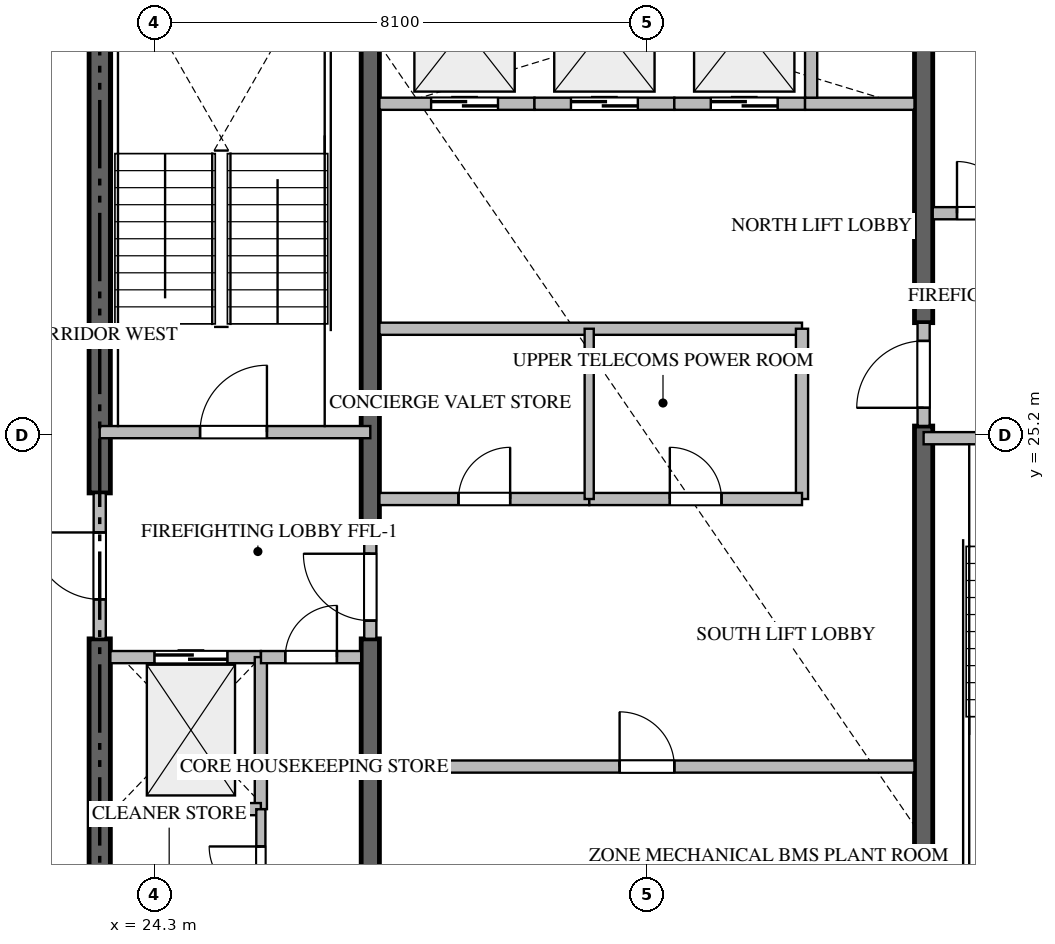
"""IFC4 building model, lengths in metres.
Left out: names, types, materials, properties, quantities, classifications, styles, units other than length and angle.
Written with IfcOpenShell. Run it as: python <this file> out.ifc"""

import sys

from ifc_helpers import new_model, si_unit, direction, frame, frame_2d, origin, place, context, subcontext, project, spatial, rectangle, extrude, source, transform, mapped, element, fill, save


model = new_model("IFC4")
c1 = context("Model", 3, precision=1e-05, world=origin(), true_north=direction((0.0, 1.0)))
c2 = subcontext(c1, "Body", "Model", "MODEL_VIEW")
j1 = project(units=[si_unit("LENGTHUNIT", "METRE"), si_unit("PLANEANGLEUNIT", "RADIAN")], contexts=[c1])
p1 = place(None, origin())
s1 = spatial("IfcSite", under=j1, at=p1, CompositionType="ELEMENT")
p2 = place(p1, origin())
s2 = spatial("IfcBuilding", under=s1, at=p2, CompositionType="ELEMENT")
p3 = place(p2, frame((0.0, 0.0, 305.6)))
s3 = spatial("IfcBuildingStorey", under=s2, at=p3, CompositionType="ELEMENT", Elevation=305.6)
p4 = place(p3, frame((23.4, 16.975, -0.26), z_axis=(0.0, 0.0, 1.0), x_axis=(0.0, 1.0, 0.0)))
e1 = element("IfcWall", 1, at=p4, inside=s3, PredefinedType="SHEAR", context=c2, shape_type="SweptSolid", body=[
    extrude(rectangle(XDim=4.875, YDim=0.35, at=frame_2d((2.438, 0.0))), origin(), (0.0, 0.0, 1.0), 4.048),
])
p5 = place(p3, frame((23.4, 24.25, -0.26), z_axis=(0.0, 0.0, 1.0), x_axis=(0.0, 1.0, 0.0)))
e2 = element("IfcWall", 2, at=p5, inside=s3, PredefinedType="SHEAR", context=c2, shape_type="SweptSolid", body=[
    extrude(rectangle(XDim=9.175, YDim=0.35, at=frame_2d((4.587, 0.0))), origin(), (0.0, 0.0, 1.0), 4.048),
])
p6 = place(p3, frame((27.85, 16.975, -0.26), z_axis=(0.0, 0.0, 1.0), x_axis=(0.0, 1.0, 0.0)))
e3 = element("IfcWall", 3, at=p6, inside=s3, PredefinedType="SHEAR", context=c2, shape_type="SweptSolid", body=[
    extrude(rectangle(XDim=4.875, YDim=0.3, at=frame_2d((2.438, 0.0))), origin(), (0.0, 0.0, 1.0), 4.048),
])
p7 = place(p3, frame((27.85, 23.55, -0.26), z_axis=(0.0, 0.0, 1.0), x_axis=(0.0, 1.0, 0.0)))
e4 = element("IfcWall", 4, at=p7, inside=s3, PredefinedType="SHEAR", context=c2, shape_type="SweptSolid", body=[
    extrude(rectangle(XDim=9.875, YDim=0.3, at=frame_2d((4.938, 0.0))), origin(), (0.0, 0.0, 1.0), 4.048),
])
p8 = place(p3, frame((36.95, 16.975, -0.26), z_axis=(0.0, 0.0, 1.0), x_axis=(0.0, 1.0, 0.0)))
e5 = element("IfcWall", 5, at=p8, inside=s3, PredefinedType="SHEAR", context=c2, shape_type="SweptSolid", body=[
    extrude(rectangle(XDim=8.375, YDim=0.3, at=frame_2d((4.188, 0.0))), origin(), (0.0, 0.0, 1.0), 4.048),
])
p9 = place(p3, frame((36.95, 27.05, -0.26), z_axis=(0.0, 0.0, 1.0), x_axis=(0.0, 1.0, 0.0)))
e6 = element("IfcWall", 6, at=p9, inside=s3, PredefinedType="SHEAR", context=c2, shape_type="SweptSolid", body=[
    extrude(rectangle(XDim=6.375, YDim=0.3, at=frame_2d((3.188, 0.0))), origin(), (0.0, 0.0, 1.0), 4.048),
])
p10 = place(p3, frame((23.4, 25.25, 0.0), z_axis=(0.0, 0.0, 1.0), x_axis=(1.0, 0.0, 0.0)))
e7 = element("IfcWall", 7, at=p10, inside=s3, PredefinedType="STANDARD", context=c2, shape_type="SweptSolid", body=[
    extrude(rectangle(XDim=4.45, YDim=0.2, at=frame_2d((2.225, 0.0))), origin(), (0.0, 0.0, 1.0), 3.79),
])
p11 = place(p10, frame((1.65, 0.0, 0.0)))
e8 = element("IfcOpeningElement", 8, at=p11, cuts=e7, PredefinedType="OPENING", context=c2, shape_type="SweptSolid", body=[
    extrude(rectangle(XDim=1.1, YDim=2.15, at=frame_2d((0.55, 1.075))), frame((0.0, 0.11, 0.0), z_axis=(0.0, -1.0, 0.0), x_axis=(1.0, 0.0, 0.0)), (0.0, 0.0, 1.0), 0.22),
])
p12 = place(p3, frame((36.95, 25.15, 0.0), z_axis=(0.0, 0.0, 1.0), x_axis=(1.0, 0.0, 0.0)))
e9 = element("IfcWall", 9, at=p12, inside=s3, PredefinedType="STANDARD", context=c2, shape_type="SweptSolid", body=[
    extrude(rectangle(XDim=4.45, YDim=0.2, at=frame_2d((2.225, 0.0))), origin(), (0.0, 0.0, 1.0), 3.79),
])
p13 = place(p12, frame((1.65, 0.0, 0.0)))
e10 = element("IfcOpeningElement", 10, at=p13, cuts=e9, PredefinedType="OPENING", context=c2, shape_type="SweptSolid", body=[
    extrude(rectangle(XDim=1.1, YDim=2.15, at=frame_2d((0.55, 1.075))), frame((0.0, 0.11, 0.0), z_axis=(0.0, -1.0, 0.0), x_axis=(1.0, 0.0, 0.0)), (0.0, 0.0, 1.0), 0.22),
])
p14 = place(p3, frame((23.575, 21.55, 0.0), z_axis=(0.0, 0.0, 1.0), x_axis=(1.0, 0.0, 0.0)))
e11 = element("IfcWall", 11, at=p14, inside=s3, PredefinedType="STANDARD", context=c2, shape_type="SweptSolid", body=[
    extrude(rectangle(XDim=2.475, YDim=0.2, at=frame_2d((1.238, 0.0))), origin(), (0.0, 0.0, 1.0), 3.79),
])
p15 = place(p14, frame((0.725, 0.0, 0.0)))
e12 = element("IfcOpeningElement", 12, at=p15, cuts=e11, PredefinedType="OPENING", context=c2, shape_type="SweptSolid", body=[
    extrude(rectangle(XDim=1.2, YDim=2.2, at=frame_2d((0.6, 1.1))), frame((0.0, 0.11, 0.0), z_axis=(0.0, -1.0, 0.0), x_axis=(1.0, 0.0, 0.0)), (0.0, 0.0, 1.0), 0.22),
])
p16 = place(p3, frame((28.0, 30.65, 0.0), z_axis=(0.0, 0.0, 1.0), x_axis=(1.0, 0.0, 0.0)))
e13 = element("IfcWall", 13, at=p16, inside=s3, PredefinedType="STANDARD", context=c2, shape_type="SweptSolid", body=[
    extrude(rectangle(XDim=2.55, YDim=0.2, at=frame_2d((1.275, 0.0))), origin(), (0.0, 0.0, 1.0), 3.79),
])
p17 = place(p16, frame((0.85, 0.0, 0.0)))
e14 = element("IfcOpeningElement", 14, at=p17, cuts=e13, PredefinedType="OPENING", context=c2, shape_type="SweptSolid", body=[
    extrude(rectangle(XDim=1.1, YDim=2.2, at=frame_2d((0.55, 1.1))), frame((0.0, 0.11, 0.0), z_axis=(0.0, -1.0, 0.0), x_axis=(1.0, 0.0, 0.0)), (0.0, 0.0, 1.0), 0.22),
])
p18 = place(p3, frame((30.55, 30.65, 0.0), z_axis=(0.0, 0.0, 1.0), x_axis=(1.0, 0.0, 0.0)))
e15 = element("IfcWall", 15, at=p18, inside=s3, PredefinedType="STANDARD", context=c2, shape_type="SweptSolid", body=[
    extrude(rectangle(XDim=2.3, YDim=0.2, at=frame_2d((1.15, 0.0))), origin(), (0.0, 0.0, 1.0), 3.79),
])
p19 = place(p18, frame((0.6, 0.0, 0.0)))
e16 = element("IfcOpeningElement", 16, at=p19, cuts=e15, PredefinedType="OPENING", context=c2, shape_type="SweptSolid", body=[
    extrude(rectangle(XDim=1.1, YDim=2.2, at=frame_2d((0.55, 1.1))), frame((0.0, 0.11, 0.0), z_axis=(0.0, -1.0, 0.0), x_axis=(1.0, 0.0, 0.0)), (0.0, 0.0, 1.0), 0.22),
])
p20 = place(p3, frame((32.85, 30.65, 0.0), z_axis=(0.0, 0.0, 1.0), x_axis=(1.0, 0.0, 0.0)))
e17 = element("IfcWall", 17, at=p20, inside=s3, PredefinedType="STANDARD", context=c2, shape_type="SweptSolid", body=[
    extrude(rectangle(XDim=2.15, YDim=0.2, at=frame_2d((1.075, 0.0))), origin(), (0.0, 0.0, 1.0), 3.79),
])
p21 = place(p20, frame((0.6, 0.0, 0.0)))
e18 = element("IfcOpeningElement", 18, at=p21, cuts=e17, PredefinedType="OPENING", context=c2, shape_type="SweptSolid", body=[
    extrude(rectangle(XDim=1.1, YDim=2.2, at=frame_2d((0.55, 1.1))), frame((0.0, 0.11, 0.0), z_axis=(0.0, -1.0, 0.0), x_axis=(1.0, 0.0, 0.0)), (0.0, 0.0, 1.0), 0.22),
])
p22 = place(p3, frame((35.0, 30.65, 0.0), z_axis=(0.0, 0.0, 1.0), x_axis=(1.0, 0.0, 0.0)))
e19 = element("IfcWall", 19, at=p22, inside=s3, PredefinedType="STANDARD", context=c2, shape_type="SweptSolid", body=[
    extrude(rectangle(XDim=1.8, YDim=0.2, at=frame_2d((0.9, 0.0))), origin(), (0.0, 0.0, 1.0), 3.79),
])
p23 = place(p3, frame((35.1, 30.75, 0.0), z_axis=(0.0, 0.0, 1.0), x_axis=(0.0, 1.0, 0.0)))
e20 = element("IfcWall", 20, at=p23, inside=s3, PredefinedType="STANDARD", context=c2, shape_type="SweptSolid", body=[
    extrude(rectangle(XDim=2.675, YDim=0.2, at=frame_2d((1.337, 0.0))), origin(), (0.0, 0.0, 1.0), 3.79),
])
p24 = place(p3, frame((26.05, 19.05, 0.0), z_axis=(0.0, 0.0, 1.0), x_axis=(0.0, 1.0, 0.0)))
e21 = element("IfcWall", 21, at=p24, inside=s3, PredefinedType="STANDARD", context=c2, shape_type="SweptSolid", body=[
    extrude(rectangle(XDim=2.5, YDim=0.2, at=frame_2d((1.25, 0.0))), origin(), (0.0, 0.0, 1.0), 3.79),
])
p25 = place(p3, frame((23.575, 19.05, 0.0), z_axis=(0.0, 0.0, 1.0), x_axis=(1.0, 0.0, 0.0)))
e22 = element("IfcWall", 22, at=p25, inside=s3, PredefinedType="STANDARD", context=c2, shape_type="SweptSolid", body=[
    extrude(rectangle(XDim=2.475, YDim=0.2, at=frame_2d((1.238, 0.0))), origin(), (0.0, 0.0, 1.0), 3.79),
])
p26 = place(p3, frame((26.052, 21.55, 0.0), z_axis=(0.0, 0.0, 1.0), x_axis=(1.0, 0.0, 0.0)))
e23 = element("IfcWall", 23, at=p26, inside=s3, PredefinedType="STANDARD", context=c2, shape_type="SweptSolid", body=[
    extrude(rectangle(XDim=1.648, YDim=0.2, at=frame_2d((0.824, 0.0))), origin(), (0.0, 0.0, 1.0), 3.79),
])
p27 = place(p26, frame((0.399, 0.0, 0.0)))
e24 = element("IfcOpeningElement", 24, at=p27, cuts=e23, PredefinedType="OPENING", context=c2, shape_type="SweptSolid", body=[
    extrude(rectangle(XDim=0.85, YDim=2.1, at=frame_2d((0.425, 1.05))), frame((0.0, 0.11, 0.0), z_axis=(0.0, -1.0, 0.0), x_axis=(1.0, 0.0, 0.0)), (0.0, 0.0, 1.0), 0.22),
])
p28 = place(p3, frame((37.1, 28.85, 0.0), z_axis=(0.0, 0.0, 1.0), x_axis=(1.0, 0.0, 0.0)))
e25 = element("IfcWall", 25, at=p28, inside=s3, PredefinedType="STANDARD", context=c2, shape_type="SweptSolid", body=[
    extrude(rectangle(XDim=1.648, YDim=0.2, at=frame_2d((0.824, 0.0))), origin(), (0.0, 0.0, 1.0), 3.79),
])
p29 = place(p28, frame((0.399, 0.0, 0.0)))
e26 = element("IfcOpeningElement", 26, at=p29, cuts=e25, PredefinedType="OPENING", context=c2, shape_type="SweptSolid", body=[
    extrude(rectangle(XDim=0.85, YDim=2.1, at=frame_2d((0.425, 1.05))), frame((0.0, 0.11, 0.0), z_axis=(0.0, -1.0, 0.0), x_axis=(1.0, 0.0, 0.0)), (0.0, 0.0, 1.0), 0.22),
])
p30 = place(p3, frame((23.4, 21.852, 0.0), z_axis=(0.0, 0.0, 1.0), x_axis=(0.0, 1.0, 0.0)))
e27 = element("IfcWall", 27, at=p30, inside=s3, PredefinedType="STANDARD", context=c2, shape_type="SweptSolid", body=[
    extrude(rectangle(XDim=2.396, YDim=0.2, at=frame_2d((1.198, 0.0))), origin(), (0.0, 0.0, 1.0), 3.79),
])
p31 = place(p30, frame((0.648, 0.0, 0.0)))
e28 = element("IfcOpeningElement", 28, at=p31, cuts=e27, PredefinedType="OPENING", context=c2, shape_type="SweptSolid", body=[
    extrude(rectangle(XDim=1.1, YDim=2.15, at=frame_2d((0.55, 1.075))), frame((0.0, 0.11, 0.0), z_axis=(0.0, -1.0, 0.0), x_axis=(1.0, 0.0, 0.0)), (0.0, 0.0, 1.0), 0.22),
])
p32 = place(p3, frame((27.85, 21.852, 0.0), z_axis=(0.0, 0.0, 1.0), x_axis=(0.0, 1.0, 0.0)))
e29 = element("IfcWall", 29, at=p32, inside=s3, PredefinedType="STANDARD", context=c2, shape_type="SweptSolid", body=[
    extrude(rectangle(XDim=1.696, YDim=0.2, at=frame_2d((0.848, 0.0))), origin(), (0.0, 0.0, 1.0), 3.79),
])
p33 = place(p32, frame((0.298, 0.0, 0.0)))
e30 = element("IfcOpeningElement", 30, at=p33, cuts=e29, PredefinedType="OPENING", context=c2, shape_type="SweptSolid", body=[
    extrude(rectangle(XDim=1.1, YDim=2.15, at=frame_2d((0.55, 1.075))), frame((0.0, 0.11, 0.0), z_axis=(0.0, -1.0, 0.0), x_axis=(1.0, 0.0, 0.0)), (0.0, 0.0, 1.0), 0.22),
])
p34 = place(p3, frame((36.95, 25.352, 0.0), z_axis=(0.0, 0.0, 1.0), x_axis=(0.0, 1.0, 0.0)))
e31 = element("IfcWall", 31, at=p34, inside=s3, PredefinedType="STANDARD", context=c2, shape_type="SweptSolid", body=[
    extrude(rectangle(XDim=1.696, YDim=0.2, at=frame_2d((0.848, 0.0))), origin(), (0.0, 0.0, 1.0), 3.79),
])
p35 = place(p34, frame((0.298, 0.0, 0.0)))
e32 = element("IfcOpeningElement", 32, at=p35, cuts=e31, PredefinedType="OPENING", context=c2, shape_type="SweptSolid", body=[
    extrude(rectangle(XDim=1.1, YDim=2.15, at=frame_2d((0.55, 1.075))), frame((0.0, 0.11, 0.0), z_axis=(0.0, -1.0, 0.0), x_axis=(1.0, 0.0, 0.0)), (0.0, 0.0, 1.0), 0.22),
])
p36 = place(p3, frame((26.05, 16.975, 0.0), z_axis=(0.0, 0.0, 1.0), x_axis=(0.0, 1.0, 0.0)))
e33 = element("IfcWall", 33, at=p36, inside=s3, PredefinedType="PARTITIONING", context=c2, shape_type="SweptSolid", body=[
    extrude(rectangle(XDim=2.073, YDim=0.15, at=frame_2d((1.037, 0.0))), origin(), (0.0, 0.0, 1.0), 3.79),
])
p37 = place(p36, frame((0.611, 0.0, 0.0)))
e34 = element("IfcOpeningElement", 34, at=p37, cuts=e33, PredefinedType="OPENING", context=c2, shape_type="SweptSolid", body=[
    extrude(rectangle(XDim=0.85, YDim=2.1, at=frame_2d((0.425, 1.05))), frame((0.0, 0.085, 0.0), z_axis=(0.0, -1.0, 0.0), x_axis=(1.0, 0.0, 0.0)), (0.0, 0.0, 1.0), 0.17),
])
p38 = place(p3, frame((28.0, 19.75, 0.0), z_axis=(0.0, 0.0, 1.0), x_axis=(1.0, 0.0, 0.0)))
e35 = element("IfcWall", 35, at=p38, inside=s3, PredefinedType="STANDARD", context=c2, shape_type="SweptSolid", body=[
    extrude(rectangle(XDim=8.8, YDim=0.2, at=frame_2d((4.4, 0.0))), origin(), (0.0, 0.0, 1.0), 3.79),
])
p39 = place(p38, frame((3.95, 0.0, 0.0)))
e36 = element("IfcOpeningElement", 36, at=p39, cuts=e35, PredefinedType="OPENING", context=c2, shape_type="SweptSolid", body=[
    extrude(rectangle(XDim=0.9, YDim=2.1, at=frame_2d((0.45, 1.05))), frame((0.0, 0.11, 0.0), z_axis=(0.0, -1.0, 0.0), x_axis=(1.0, 0.0, 0.0)), (0.0, 0.0, 1.0), 0.22),
])
p40 = place(p3, frame((28.0, 26.95, 0.0), z_axis=(0.0, 0.0, 1.0), x_axis=(1.0, 0.0, 0.0)))
e37 = element("IfcWall", 37, at=p40, inside=s3, PredefinedType="STANDARD", context=c2, shape_type="SweptSolid", body=[
    extrude(rectangle(XDim=6.95, YDim=0.2, at=frame_2d((3.475, 0.0))), origin(), (0.0, 0.0, 1.0), 3.79),
])
p41 = place(p3, frame((34.95, 24.15, 0.0), z_axis=(0.0, 0.0, 1.0), x_axis=(0.0, 1.0, 0.0)))
e38 = element("IfcWall", 38, at=p41, inside=s3, PredefinedType="STANDARD", context=c2, shape_type="SweptSolid", body=[
    extrude(rectangle(XDim=2.8, YDim=0.2, at=frame_2d((1.4, 0.0))), origin(), (0.0, 0.0, 1.0), 3.79),
])
p42 = place(p3, frame((28.0, 24.15, 0.0), z_axis=(0.0, 0.0, 1.0), x_axis=(1.0, 0.0, 0.0)))
e39 = element("IfcWall", 39, at=p42, inside=s3, PredefinedType="STANDARD", context=c2, shape_type="SweptSolid", body=[
    extrude(rectangle(XDim=3.45, YDim=0.2, at=frame_2d((1.725, 0.0))), origin(), (0.0, 0.0, 1.0), 3.79),
])
p43 = place(p42, frame((1.3, 0.0, 0.0)))
e40 = element("IfcOpeningElement", 40, at=p43, cuts=e39, PredefinedType="OPENING", context=c2, shape_type="SweptSolid", body=[
    extrude(rectangle(XDim=0.85, YDim=2.1, at=frame_2d((0.425, 1.05))), frame((0.0, 0.11, 0.0), z_axis=(0.0, -1.0, 0.0), x_axis=(1.0, 0.0, 0.0)), (0.0, 0.0, 1.0), 0.22),
])
p44 = place(p3, frame((31.452, 24.15, 0.0), z_axis=(0.0, 0.0, 1.0), x_axis=(1.0, 0.0, 0.0)))
e41 = element("IfcWall", 41, at=p44, inside=s3, PredefinedType="STANDARD", context=c2, shape_type="SweptSolid", body=[
    extrude(rectangle(XDim=3.498, YDim=0.2, at=frame_2d((1.749, 0.0))), origin(), (0.0, 0.0, 1.0), 3.79),
])
p45 = place(p44, frame((1.324, 0.0, 0.0)))
e42 = element("IfcOpeningElement", 42, at=p45, cuts=e41, PredefinedType="OPENING", context=c2, shape_type="SweptSolid", body=[
    extrude(rectangle(XDim=0.85, YDim=2.1, at=frame_2d((0.425, 1.05))), frame((0.0, 0.11, 0.0), z_axis=(0.0, -1.0, 0.0), x_axis=(1.0, 0.0, 0.0)), (0.0, 0.0, 1.0), 0.22),
])
p46 = place(p3, frame((31.45, 24.15, 0.0), z_axis=(0.0, 0.0, 1.0), x_axis=(0.0, 1.0, 0.0)))
e43 = element("IfcWall", 43, at=p46, inside=s3, PredefinedType="PARTITIONING", context=c2, shape_type="SweptSolid", body=[
    extrude(rectangle(XDim=2.8, YDim=0.15, at=frame_2d((1.4, 0.0))), origin(), (0.0, 0.0, 1.0), 3.79),
])
m1 = source(origin(), c2, "Body", "SweptSolid", [
    extrude(rectangle(XDim=1.1, YDim=2.15, at=frame_2d((0.55, 1.075))), frame((0.0, 0.025, 0.0), z_axis=(0.0, -1.0, 0.0), x_axis=(1.0, 0.0, 0.0)), (0.0, 0.0, 1.0), 0.05),
])
p47 = place(p11, origin())
e44 = element("IfcDoor", 44, at=p47, inside=s3, OperationType="SINGLE_SWING_RIGHT", PredefinedType="DOOR", context=c2, shape_type="MappedRepresentation", body=[
    mapped(m1, transform((0.0, 0.0, 0.0), scale=1.0)),
])
fill(e8, e44)
m2 = source(origin(), c2, "Body", "SweptSolid", [
    extrude(rectangle(XDim=1.2, YDim=2.2, at=frame_2d((0.6, 1.1))), frame((0.0, 0.025, 0.0), z_axis=(0.0, -1.0, 0.0), x_axis=(1.0, 0.0, 0.0)), (0.0, 0.0, 1.0), 0.05),
])
p48 = place(p15, origin())
e45 = element("IfcDoor", 45, at=p48, inside=s3, OperationType="DOUBLE_DOOR_SLIDING", PredefinedType="DOOR", context=c2, shape_type="MappedRepresentation", body=[
    mapped(m2, transform((0.0, 0.0, 0.0), scale=1.0)),
])
fill(e12, e45)
m3 = source(origin(), c2, "Body", "SweptSolid", [
    extrude(rectangle(XDim=1.1, YDim=2.2, at=frame_2d((0.55, 1.1))), frame((0.0, 0.025, 0.0), z_axis=(0.0, -1.0, 0.0), x_axis=(1.0, 0.0, 0.0)), (0.0, 0.0, 1.0), 0.05),
])
p49 = place(p17, origin())
e46 = element("IfcDoor", 46, at=p49, inside=s3, OperationType="DOUBLE_DOOR_SLIDING", PredefinedType="DOOR", context=c2, shape_type="MappedRepresentation", body=[
    mapped(m3, transform((0.0, 0.0, 0.0), scale=1.0)),
])
fill(e14, e46)
p50 = place(p19, origin())
e47 = element("IfcDoor", 47, at=p50, inside=s3, OperationType="DOUBLE_DOOR_SLIDING", PredefinedType="DOOR", context=c2, shape_type="MappedRepresentation", body=[
    mapped(m3, transform((0.0, 0.0, 0.0), scale=1.0)),
])
fill(e16, e47)
p51 = place(p21, origin())
e48 = element("IfcDoor", 48, at=p51, inside=s3, OperationType="DOUBLE_DOOR_SLIDING", PredefinedType="DOOR", context=c2, shape_type="MappedRepresentation", body=[
    mapped(m3, transform((0.0, 0.0, 0.0), scale=1.0)),
])
fill(e18, e48)
m4 = source(origin(), c2, "Body", "SweptSolid", [
    extrude(rectangle(XDim=0.85, YDim=2.1, at=frame_2d((0.425, 1.05))), frame((0.0, 0.025, 0.0), z_axis=(0.0, -1.0, 0.0), x_axis=(1.0, 0.0, 0.0)), (0.0, 0.0, 1.0), 0.05),
])
p52 = place(p27, origin())
e49 = element("IfcDoor", 49, at=p52, inside=s3, OperationType="SINGLE_SWING_RIGHT", PredefinedType="DOOR", context=c2, shape_type="MappedRepresentation", body=[
    mapped(m4, transform((0.0, 0.0, 0.0), scale=1.0)),
])
fill(e24, e49)
p53 = place(p29, origin())
e50 = element("IfcDoor", 50, at=p53, inside=s3, OperationType="SINGLE_SWING_LEFT", PredefinedType="DOOR", context=c2, shape_type="MappedRepresentation", body=[
    mapped(m4, transform((0.0, 0.0, 0.0), scale=1.0)),
])
fill(e26, e50)
p54 = place(p31, origin())
e51 = element("IfcDoor", 51, at=p54, inside=s3, OperationType="SINGLE_SWING_RIGHT", PredefinedType="DOOR", context=c2, shape_type="MappedRepresentation", body=[
    mapped(m1, transform((0.0, 0.0, 0.0), scale=1.0)),
])
fill(e28, e51)
p55 = place(p33, origin())
e52 = element("IfcDoor", 52, at=p55, inside=s3, OperationType="SINGLE_SWING_RIGHT", PredefinedType="DOOR", context=c2, shape_type="MappedRepresentation", body=[
    mapped(m1, transform((0.0, 0.0, 0.0), scale=1.0)),
])
fill(e30, e52)
p56 = place(p35, origin())
e53 = element("IfcDoor", 53, at=p56, inside=s3, OperationType="SINGLE_SWING_LEFT", PredefinedType="DOOR", context=c2, shape_type="MappedRepresentation", body=[
    mapped(m1, transform((0.0, 0.0, 0.0), scale=1.0)),
])
fill(e32, e53)
p57 = place(p37, origin())
e54 = element("IfcDoor", 54, at=p57, inside=s3, OperationType="SINGLE_SWING_RIGHT", PredefinedType="DOOR", context=c2, shape_type="MappedRepresentation", body=[
    mapped(m4, transform((0.0, 0.0, 0.0), scale=1.0)),
])
fill(e34, e54)
m5 = source(origin(), c2, "Body", "SweptSolid", [
    extrude(rectangle(XDim=0.9, YDim=2.1, at=frame_2d((0.45, 1.05))), frame((0.0, 0.025, 0.0), z_axis=(0.0, -1.0, 0.0), x_axis=(1.0, 0.0, 0.0)), (0.0, 0.0, 1.0), 0.05),
])
p58 = place(p39, origin())
e55 = element("IfcDoor", 55, at=p58, inside=s3, OperationType="SINGLE_SWING_LEFT", PredefinedType="DOOR", context=c2, shape_type="MappedRepresentation", body=[
    mapped(m5, transform((0.0, 0.0, 0.0), scale=1.0)),
])
fill(e36, e55)
p59 = place(p43, origin())
e56 = element("IfcDoor", 56, at=p59, inside=s3, OperationType="SINGLE_SWING_RIGHT", PredefinedType="DOOR", context=c2, shape_type="MappedRepresentation", body=[
    mapped(m4, transform((0.0, 0.0, 0.0), scale=1.0)),
])
fill(e40, e56)
p60 = place(p45, origin())
e57 = element("IfcDoor", 57, at=p60, inside=s3, OperationType="SINGLE_SWING_LEFT", PredefinedType="DOOR", context=c2, shape_type="MappedRepresentation", body=[
    mapped(m4, transform((0.0, 0.0, 0.0), scale=1.0)),
])
fill(e42, e57)
save(model, sys.argv[1])
